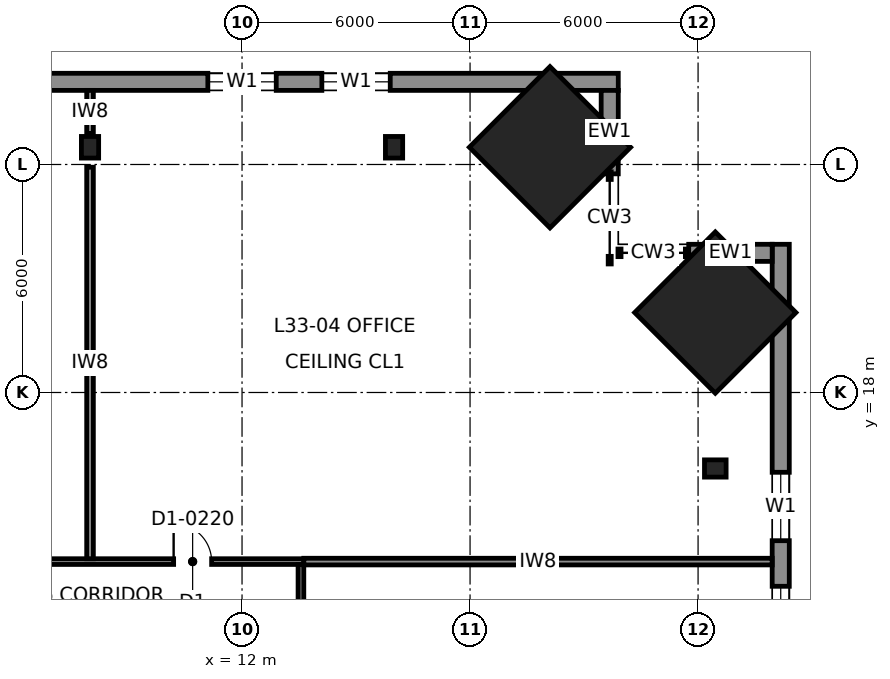
"""IFC4 building model, lengths in metres.
Left out: names, types, materials, properties, quantities, classifications, styles, units other than length and angle.
Written with IfcOpenShell. Run it as: python <this file> out.ifc"""

import sys

from ifc_helpers import new_model, si_unit, direction, frame, frame_2d, origin, origin_2d, place, context, subcontext, project, spatial, rectangle, i_section, extrude, element, fill, save


model = new_model("IFC4")
c1 = context("Model", 3, precision=1e-05, world=origin(), true_north=direction((0.0, 1.0)))
c2 = subcontext(c1, "Body", "Model", "MODEL_VIEW")
j1 = project(units=[si_unit("LENGTHUNIT", "METRE"), si_unit("PLANEANGLEUNIT", "RADIAN")], contexts=[c1])
p1 = place(None, origin())
s1 = spatial("IfcSite", under=j1, at=p1, CompositionType="ELEMENT")
p2 = place(p1, origin())
s2 = spatial("IfcBuilding", under=s1, at=p2, CompositionType="ELEMENT")
p3 = place(p2, frame((0.0, 0.0, 159.8)))
s3 = spatial("IfcBuildingStorey", under=s2, at=p3, CompositionType="ELEMENT", Elevation=159.8)
for number, where, z_axis, x_axis in (
    (1, (20.103, 24.453, 0.0), (-0.04, -0.04, 0.998), (0.707, -0.708, 0.0)),
    (2, (24.453, 20.103, 0.0), (-0.04, -0.04, 0.998), (0.708, -0.707, 0.0)),
):
    element("IfcColumn", number, at=place(p3, frame(where, z_axis=z_axis, x_axis=x_axis)), inside=s3, PredefinedType="COLUMN", context=c2, shape_type="SweptSolid", body=[
        extrude(rectangle(XDim=3.0, YDim=3.0, at=origin_2d()), origin(), (0.0, 0.0, 1.0), 4.007),
    ])
for number, where, z_axis, x_axis in (
    (3, (8.0, 24.453, 0.0), (0.0, -0.04, 0.999), (1.0, 0.0, 0.0)),
    (4, (16.0, 24.453, 0.0), (0.0, -0.04, 0.999), (1.0, 0.0, 0.0)),
    (5, (24.453, 16.0, 0.0), (-0.04, 0.0, 0.999), (0.0, -1.0, 0.0)),
):
    element("IfcColumn", number, at=place(p3, frame(where, z_axis=z_axis, x_axis=x_axis)), inside=s3, PredefinedType="COLUMN", context=c2, shape_type="SweptSolid", body=[
        extrude(i_section(OverallWidth=0.454, OverallDepth=0.569, WebThickness=0.078, FlangeThickness=0.125, at=origin_2d()), origin(), (0.0, 0.0, 1.0), 4.003),
    ])
p4 = place(p3, frame((21.9, 26.175, 0.0), z_axis=(0.0, 0.0, 1.0), x_axis=(-1.0, 0.0, 0.0)))
e6 = element("IfcWall", 6, at=p4, inside=s3, PredefinedType="SOLIDWALL", context=c2, shape_type="SweptSolid", body=[
    extrude(rectangle(XDim=43.8, YDim=0.45, at=frame_2d((21.9, 0.0))), origin(), (0.0, 0.0, 1.0), 3.83),
])
p5 = place(p4, frame((6.0, 0.0, 0.7)))
e7 = element("IfcOpeningElement", 7, at=p5, cuts=e6, PredefinedType="OPENING", context=c2, shape_type="SweptSolid", body=[
    extrude(rectangle(XDim=1.8, YDim=2.6, at=frame_2d((0.9, 1.3))), frame((0.0, 0.235, 0.0), z_axis=(0.0, -1.0, 0.0), x_axis=(1.0, 0.0, 0.0)), (0.0, 0.0, 1.0), 0.47),
])
p6 = place(p4, frame((9.0, 0.0, 0.7)))
e8 = element("IfcOpeningElement", 8, at=p6, cuts=e6, PredefinedType="OPENING", context=c2, shape_type="SweptSolid", body=[
    extrude(rectangle(XDim=1.8, YDim=2.6, at=frame_2d((0.9, 1.3))), frame((0.0, 0.235, 0.0), z_axis=(0.0, -1.0, 0.0), x_axis=(1.0, 0.0, 0.0)), (0.0, 0.0, 1.0), 0.47),
])
p7 = place(p4, frame((15.0, 0.0, 0.7)))
e9 = element("IfcOpeningElement", 9, at=p7, cuts=e6, PredefinedType="OPENING", context=c2, shape_type="SweptSolid", body=[
    extrude(rectangle(XDim=1.8, YDim=2.6, at=frame_2d((0.9, 1.3))), frame((0.0, 0.235, 0.0), z_axis=(0.0, -1.0, 0.0), x_axis=(1.0, 0.0, 0.0)), (0.0, 0.0, 1.0), 0.47),
])
p8 = place(p4, frame((18.0, 0.0, 0.7)))
e10 = element("IfcOpeningElement", 10, at=p8, cuts=e6, PredefinedType="OPENING", context=c2, shape_type="SweptSolid", body=[
    extrude(rectangle(XDim=1.8, YDim=2.6, at=frame_2d((0.9, 1.3))), frame((0.0, 0.235, 0.0), z_axis=(0.0, -1.0, 0.0), x_axis=(1.0, 0.0, 0.0)), (0.0, 0.0, 1.0), 0.47),
])
p9 = place(p4, frame((24.0, 0.0, 0.7)))
e11 = element("IfcOpeningElement", 11, at=p9, cuts=e6, PredefinedType="OPENING", context=c2, shape_type="SweptSolid", body=[
    extrude(rectangle(XDim=1.8, YDim=2.6, at=frame_2d((0.9, 1.3))), frame((0.0, 0.235, 0.0), z_axis=(0.0, -1.0, 0.0), x_axis=(1.0, 0.0, 0.0)), (0.0, 0.0, 1.0), 0.47),
])
p10 = place(p4, frame((27.0, 0.0, 0.7)))
e12 = element("IfcOpeningElement", 12, at=p10, cuts=e6, PredefinedType="OPENING", context=c2, shape_type="SweptSolid", body=[
    extrude(rectangle(XDim=1.8, YDim=2.6, at=frame_2d((0.9, 1.3))), frame((0.0, 0.235, 0.0), z_axis=(0.0, -1.0, 0.0), x_axis=(1.0, 0.0, 0.0)), (0.0, 0.0, 1.0), 0.47),
])
p11 = place(p4, frame((33.0, 0.0, 0.7)))
e13 = element("IfcOpeningElement", 13, at=p11, cuts=e6, PredefinedType="OPENING", context=c2, shape_type="SweptSolid", body=[
    extrude(rectangle(XDim=1.8, YDim=2.6, at=frame_2d((0.9, 1.3))), frame((0.0, 0.235, 0.0), z_axis=(0.0, -1.0, 0.0), x_axis=(1.0, 0.0, 0.0)), (0.0, 0.0, 1.0), 0.47),
])
p12 = place(p4, frame((36.0, 0.0, 0.7)))
e14 = element("IfcOpeningElement", 14, at=p12, cuts=e6, PredefinedType="OPENING", context=c2, shape_type="SweptSolid", body=[
    extrude(rectangle(XDim=1.8, YDim=2.6, at=frame_2d((0.9, 1.3))), frame((0.0, 0.235, 0.0), z_axis=(0.0, -1.0, 0.0), x_axis=(1.0, 0.0, 0.0)), (0.0, 0.0, 1.0), 0.47),
])
p13 = place(p3, frame((26.175, -21.9, 0.0), z_axis=(0.0, 0.0, 1.0), x_axis=(0.0, 1.0, 0.0)))
e15 = element("IfcWall", 15, at=p13, inside=s3, PredefinedType="SOLIDWALL", context=c2, shape_type="SweptSolid", body=[
    extrude(rectangle(XDim=43.8, YDim=0.45, at=frame_2d((21.9, 0.0))), origin(), (0.0, 0.0, 1.0), 3.83),
])
p14 = place(p13, frame((6.0, 0.0, 0.7)))
e16 = element("IfcOpeningElement", 16, at=p14, cuts=e15, PredefinedType="OPENING", context=c2, shape_type="SweptSolid", body=[
    extrude(rectangle(XDim=1.8, YDim=2.6, at=frame_2d((0.9, 1.3))), frame((0.0, 0.235, 0.0), z_axis=(0.0, -1.0, 0.0), x_axis=(1.0, 0.0, 0.0)), (0.0, 0.0, 1.0), 0.47),
])
p15 = place(p13, frame((9.0, 0.0, 0.7)))
e17 = element("IfcOpeningElement", 17, at=p15, cuts=e15, PredefinedType="OPENING", context=c2, shape_type="SweptSolid", body=[
    extrude(rectangle(XDim=1.8, YDim=2.6, at=frame_2d((0.9, 1.3))), frame((0.0, 0.235, 0.0), z_axis=(0.0, -1.0, 0.0), x_axis=(1.0, 0.0, 0.0)), (0.0, 0.0, 1.0), 0.47),
])
p16 = place(p13, frame((15.0, 0.0, 0.7)))
e18 = element("IfcOpeningElement", 18, at=p16, cuts=e15, PredefinedType="OPENING", context=c2, shape_type="SweptSolid", body=[
    extrude(rectangle(XDim=1.8, YDim=2.6, at=frame_2d((0.9, 1.3))), frame((0.0, 0.235, 0.0), z_axis=(0.0, -1.0, 0.0), x_axis=(1.0, 0.0, 0.0)), (0.0, 0.0, 1.0), 0.47),
])
p17 = place(p13, frame((18.0, 0.0, 0.7)))
e19 = element("IfcOpeningElement", 19, at=p17, cuts=e15, PredefinedType="OPENING", context=c2, shape_type="SweptSolid", body=[
    extrude(rectangle(XDim=1.8, YDim=2.6, at=frame_2d((0.9, 1.3))), frame((0.0, 0.235, 0.0), z_axis=(0.0, -1.0, 0.0), x_axis=(1.0, 0.0, 0.0)), (0.0, 0.0, 1.0), 0.47),
])
p18 = place(p13, frame((24.0, 0.0, 0.7)))
e20 = element("IfcOpeningElement", 20, at=p18, cuts=e15, PredefinedType="OPENING", context=c2, shape_type="SweptSolid", body=[
    extrude(rectangle(XDim=1.8, YDim=2.6, at=frame_2d((0.9, 1.3))), frame((0.0, 0.235, 0.0), z_axis=(0.0, -1.0, 0.0), x_axis=(1.0, 0.0, 0.0)), (0.0, 0.0, 1.0), 0.47),
])
p19 = place(p13, frame((27.0, 0.0, 0.7)))
e21 = element("IfcOpeningElement", 21, at=p19, cuts=e15, PredefinedType="OPENING", context=c2, shape_type="SweptSolid", body=[
    extrude(rectangle(XDim=1.8, YDim=2.6, at=frame_2d((0.9, 1.3))), frame((0.0, 0.235, 0.0), z_axis=(0.0, -1.0, 0.0), x_axis=(1.0, 0.0, 0.0)), (0.0, 0.0, 1.0), 0.47),
])
p20 = place(p13, frame((33.0, 0.0, 0.7)))
e22 = element("IfcOpeningElement", 22, at=p20, cuts=e15, PredefinedType="OPENING", context=c2, shape_type="SweptSolid", body=[
    extrude(rectangle(XDim=1.8, YDim=2.6, at=frame_2d((0.9, 1.3))), frame((0.0, 0.235, 0.0), z_axis=(0.0, -1.0, 0.0), x_axis=(1.0, 0.0, 0.0)), (0.0, 0.0, 1.0), 0.47),
])
p21 = place(p13, frame((36.0, 0.0, 0.7)))
e23 = element("IfcOpeningElement", 23, at=p21, cuts=e15, PredefinedType="OPENING", context=c2, shape_type="SweptSolid", body=[
    extrude(rectangle(XDim=1.8, YDim=2.6, at=frame_2d((0.9, 1.3))), frame((0.0, 0.235, 0.0), z_axis=(0.0, -1.0, 0.0), x_axis=(1.0, 0.0, 0.0)), (0.0, 0.0, 1.0), 0.47),
])
for number, where, z_axis, x_axis in (
    (24, (21.675, 23.754, 0.0), (0.0, 0.0, 1.0), (0.0, 1.0, 0.0)),
    (25, (23.754, 21.675, 0.0), (0.0, 0.0, 1.0), (1.0, 0.0, 0.0)),
):
    element("IfcWall", number, at=place(p3, frame(where, z_axis=z_axis, x_axis=x_axis)), inside=s3, PredefinedType="SOLIDWALL", context=c2, shape_type="SweptSolid", body=[
        extrude(rectangle(XDim=2.196, YDim=0.45, at=frame_2d((1.098, 0.0))), origin(), (0.0, 0.0, 1.0), 3.83),
    ])
p22 = place(p3, frame((-13.625, 13.55, 0.0), z_axis=(0.0, 0.0, 1.0), x_axis=(1.0, 0.0, 0.0)))
e26 = element("IfcWall", 26, at=p22, inside=s3, PredefinedType="PARTITIONING", context=c2, shape_type="SweptSolid", body=[
    extrude(rectangle(XDim=27.25, YDim=0.15, at=frame_2d((13.625, 0.0))), origin(), (0.0, 0.0, 1.0), 3.83),
])
p23 = place(p22, frame((2.425, 0.0, 0.0)))
e27 = element("IfcOpeningElement", 27, at=p23, cuts=e26, PredefinedType="OPENING", context=c2, shape_type="SweptSolid", body=[
    extrude(rectangle(XDim=1.0, YDim=2.3, at=frame_2d((0.5, 1.15))), frame((0.0, 0.085, 0.0), z_axis=(0.0, -1.0, 0.0), x_axis=(1.0, 0.0, 0.0)), (0.0, 0.0, 1.0), 0.17),
])
p24 = place(p22, frame((9.125, 0.0, 0.0)))
e28 = element("IfcOpeningElement", 28, at=p24, cuts=e26, PredefinedType="OPENING", context=c2, shape_type="SweptSolid", body=[
    extrude(rectangle(XDim=1.0, YDim=2.3, at=frame_2d((0.5, 1.15))), frame((0.0, 0.085, 0.0), z_axis=(0.0, -1.0, 0.0), x_axis=(1.0, 0.0, 0.0)), (0.0, 0.0, 1.0), 0.17),
])
p25 = place(p22, frame((17.125, 0.0, 0.0)))
e29 = element("IfcOpeningElement", 29, at=p25, cuts=e26, PredefinedType="OPENING", context=c2, shape_type="SweptSolid", body=[
    extrude(rectangle(XDim=1.0, YDim=2.3, at=frame_2d((0.5, 1.15))), frame((0.0, 0.085, 0.0), z_axis=(0.0, -1.0, 0.0), x_axis=(1.0, 0.0, 0.0)), (0.0, 0.0, 1.0), 0.17),
])
p26 = place(p22, frame((23.825, 0.0, 0.0)))
e30 = element("IfcOpeningElement", 30, at=p26, cuts=e26, PredefinedType="OPENING", context=c2, shape_type="SweptSolid", body=[
    extrude(rectangle(XDim=1.0, YDim=2.3, at=frame_2d((0.5, 1.15))), frame((0.0, 0.085, 0.0), z_axis=(0.0, -1.0, 0.0), x_axis=(1.0, 0.0, 0.0)), (0.0, 0.0, 1.0), 0.17),
])
p27 = place(p3, frame((13.55, -13.575, 0.0), z_axis=(0.0, 0.0, 1.0), x_axis=(0.0, 1.0, 0.0)))
e31 = element("IfcWall", 31, at=p27, inside=s3, PredefinedType="PARTITIONING", context=c2, shape_type="SweptSolid", body=[
    extrude(rectangle(XDim=27.05, YDim=0.15, at=frame_2d((13.525, 0.0))), origin(), (0.0, 0.0, 1.0), 3.83),
])
p28 = place(p27, frame((6.975, 0.0, 0.0)))
e32 = element("IfcOpeningElement", 32, at=p28, cuts=e31, PredefinedType="OPENING", context=c2, shape_type="SweptSolid", body=[
    extrude(rectangle(XDim=1.4, YDim=2.3, at=frame_2d((0.7, 1.15))), frame((0.0, 0.085, 0.0), z_axis=(0.0, -1.0, 0.0), x_axis=(1.0, 0.0, 0.0)), (0.0, 0.0, 1.0), 0.17),
])
p29 = place(p27, frame((19.775, 0.0, 0.0)))
e33 = element("IfcOpeningElement", 33, at=p29, cuts=e31, PredefinedType="OPENING", context=c2, shape_type="SweptSolid", body=[
    extrude(rectangle(XDim=1.0, YDim=2.3, at=frame_2d((0.5, 1.15))), frame((0.0, 0.085, 0.0), z_axis=(0.0, -1.0, 0.0), x_axis=(1.0, 0.0, 0.0)), (0.0, 0.0, 1.0), 0.17),
])
p30 = place(p27, frame((23.775, 0.0, 0.0)))
e34 = element("IfcOpeningElement", 34, at=p30, cuts=e31, PredefinedType="OPENING", context=c2, shape_type="SweptSolid", body=[
    extrude(rectangle(XDim=1.0, YDim=2.3, at=frame_2d((0.5, 1.15))), frame((0.0, 0.085, 0.0), z_axis=(0.0, -1.0, 0.0), x_axis=(1.0, 0.0, 0.0)), (0.0, 0.0, 1.0), 0.17),
])
p31 = place(p27, frame((16.825, 0.0, 0.0)))
e35 = element("IfcOpeningElement", 35, at=p31, cuts=e31, PredefinedType="OPENING", context=c2, shape_type="SweptSolid", body=[
    extrude(rectangle(XDim=1.0, YDim=2.3, at=frame_2d((0.5, 1.15))), frame((0.0, 0.085, 0.0), z_axis=(0.0, -1.0, 0.0), x_axis=(1.0, 0.0, 0.0)), (0.0, 0.0, 1.0), 0.17),
])
p32 = place(p3, frame((13.625, 13.55, 0.0), z_axis=(0.0, 0.0, 1.0), x_axis=(1.0, 0.0, 0.0)))
e36 = element("IfcWall", 36, at=p32, inside=s3, PredefinedType="PARTITIONING", context=c2, shape_type="SweptSolid", body=[
    extrude(rectangle(XDim=12.325, YDim=0.175, at=frame_2d((6.163, 0.0))), origin(), (0.0, 0.0, 1.0), 3.83),
])
p33 = place(p3, frame((8.0, 13.625, 0.0), z_axis=(0.0, 0.0, 1.0), x_axis=(0.0, 1.0, 0.0)))
e37 = element("IfcWall", 37, at=p33, inside=s3, PredefinedType="PARTITIONING", context=c2, shape_type="SweptSolid", body=[
    extrude(rectangle(XDim=10.303, YDim=0.175, at=frame_2d((5.151, 0.0))), origin(), (0.0, 0.0, 1.0), 2.84),
])
p34 = place(p3, frame((8.0, 24.817, 0.0), z_axis=(0.0, 0.0, 1.0), x_axis=(0.0, 1.0, 0.0)))
e38 = element("IfcWall", 38, at=p34, inside=s3, PredefinedType="PARTITIONING", context=c2, shape_type="SweptSolid", body=[
    extrude(rectangle(XDim=1.133, YDim=0.175, at=frame_2d((0.566, 0.0))), origin(), (0.0, 0.0, 1.0), 3.83),
])
p35 = place(p5, origin())
e39 = element("IfcWindow", 39, at=p35, inside=s3, PartitioningType="SINGLE_PANEL", PredefinedType="WINDOW", context=c2, shape_type="SweptSolid", body=[
    extrude(rectangle(XDim=1.8, YDim=2.6, at=frame_2d((0.9, 1.3))), frame((0.0, 0.03, 0.0), z_axis=(0.0, -1.0, 0.0), x_axis=(1.0, 0.0, 0.0)), (0.0, 0.0, 1.0), 0.06),
])
fill(e7, e39)
p36 = place(p6, origin())
e40 = element("IfcWindow", 40, at=p36, inside=s3, PartitioningType="SINGLE_PANEL", PredefinedType="WINDOW", context=c2, shape_type="SweptSolid", body=[
    extrude(rectangle(XDim=1.8, YDim=2.6, at=frame_2d((0.9, 1.3))), frame((0.0, 0.03, 0.0), z_axis=(0.0, -1.0, 0.0), x_axis=(1.0, 0.0, 0.0)), (0.0, 0.0, 1.0), 0.06),
])
fill(e8, e40)
p37 = place(p20, origin())
e41 = element("IfcWindow", 41, at=p37, inside=s3, PartitioningType="SINGLE_PANEL", PredefinedType="WINDOW", context=c2, shape_type="SweptSolid", body=[
    extrude(rectangle(XDim=1.8, YDim=2.6, at=frame_2d((0.9, 1.3))), frame((0.0, 0.03, 0.0), z_axis=(0.0, -1.0, 0.0), x_axis=(1.0, 0.0, 0.0)), (0.0, 0.0, 1.0), 0.06),
])
fill(e22, e41)
p38 = place(p21, origin())
e42 = element("IfcWindow", 42, at=p38, inside=s3, PartitioningType="SINGLE_PANEL", PredefinedType="WINDOW", context=c2, shape_type="SweptSolid", body=[
    extrude(rectangle(XDim=1.8, YDim=2.6, at=frame_2d((0.9, 1.3))), frame((0.0, 0.03, 0.0), z_axis=(0.0, -1.0, 0.0), x_axis=(1.0, 0.0, 0.0)), (0.0, 0.0, 1.0), 0.06),
])
fill(e23, e42)
p39 = place(p26, origin())
e43 = element("IfcDoor", 43, at=p39, inside=s3, OperationType="SINGLE_SWING_LEFT", PredefinedType="DOOR", context=c2, shape_type="SweptSolid", body=[
    extrude(rectangle(XDim=1.0, YDim=2.3, at=frame_2d((0.5, 1.15))), frame((0.0, 0.025, 0.0), z_axis=(0.0, -1.0, 0.0), x_axis=(1.0, 0.0, 0.0)), (0.0, 0.0, 1.0), 0.05),
])
fill(e30, e43)
save(model, sys.argv[1])
